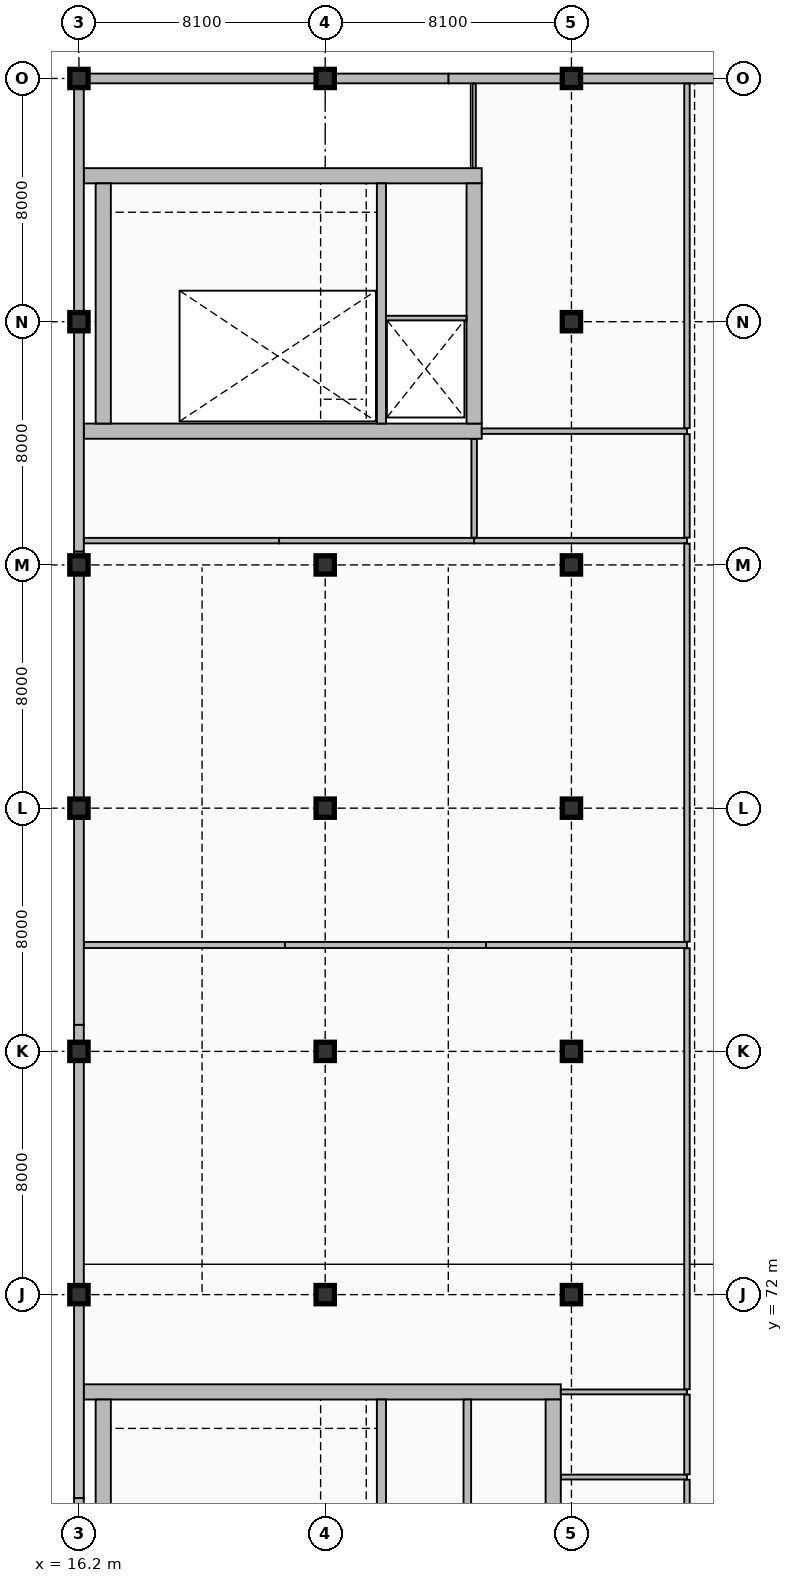
"""IFC4 building model, lengths in metres.
Left out: names, types, materials, properties, quantities, classifications, styles, units other than length and angle.
Written with IfcOpenShell. Run it as: python <this file> out.ifc"""

import sys

from ifc_helpers import new_model, si_unit, direction, frame, frame_2d, origin, origin_2d, place, context, subcontext, project, spatial, rectangle, extrude, element, fill, save


model = new_model("IFC4")
c1 = context("Model", 3, precision=1e-05, world=origin(), true_north=direction((0.0, 1.0)))
c2 = subcontext(c1, "Body", "Model", "MODEL_VIEW")
j1 = project(units=[si_unit("LENGTHUNIT", "METRE"), si_unit("PLANEANGLEUNIT", "RADIAN")], contexts=[c1])
p1 = place(None, origin())
s1 = spatial("IfcSite", under=j1, at=p1, CompositionType="ELEMENT")
p2 = place(p1, origin())
s2 = spatial("IfcBuilding", under=s1, at=p2, CompositionType="ELEMENT")
p3 = place(p2, frame((0.0, 0.0, 14.7)))
s3 = spatial("IfcBuildingStorey", under=s2, at=p3, CompositionType="ELEMENT", Elevation=14.7)
p4 = place(p3, frame((16.36, 68.8, 0.0), z_axis=(0.0, 0.0, 1.0), x_axis=(1.0, 0.0, 0.0)))
e1 = element("IfcWall", 1, at=p4, inside=s3, PredefinedType="SHEAR", context=c2, shape_type="SweptSolid", body=[
    extrude(rectangle(XDim=15.69, YDim=0.5, at=frame_2d((7.845, 0.0))), origin(), (0.0, 0.0, 1.0), 5.1),
])
for number, where, z_axis, x_axis in (
    (2, (17.0, 60.65, 0.0), (0.0, 0.0, 1.0), (0.0, 1.0, 0.0)),
    (3, (31.8, 60.65, 0.0), (0.0, 0.0, 1.0), (0.0, 1.0, 0.0)),
):
    element("IfcWall", number, at=place(p3, frame(where, z_axis=z_axis, x_axis=x_axis)), inside=s3, PredefinedType="SHEAR", context=c2, shape_type="SweptSolid", body=[
        extrude(rectangle(XDim=7.9, YDim=0.5, at=frame_2d((3.95, 0.0))), origin(), (0.0, 0.0, 1.0), 5.1),
    ])
p5 = place(p3, frame((26.15, 60.65, 0.0), z_axis=(0.0, 0.0, 1.0), x_axis=(0.0, 1.0, 0.0)))
e4 = element("IfcWall", 4, at=p5, inside=s3, PredefinedType="SHEAR", context=c2, shape_type="SweptSolid", body=[
    extrude(rectangle(XDim=7.9, YDim=0.3, at=frame_2d((3.95, 0.0))), origin(), (0.0, 0.0, 1.0), 5.1),
])
p6 = place(p3, frame((28.975, 60.65, 0.0), z_axis=(0.0, 0.0, 1.0), x_axis=(0.0, 1.0, 0.0)))
e5 = element("IfcWall", 5, at=p6, inside=s3, PredefinedType="SHEAR", context=c2, shape_type="SweptSolid", body=[
    extrude(rectangle(XDim=7.9, YDim=0.25, at=frame_2d((3.95, 0.0))), origin(), (0.0, 0.0, 1.0), 5.1),
])
p7 = place(p3, frame((16.36, 100.4, 0.0), z_axis=(0.0, 0.0, 1.0), x_axis=(1.0, 0.0, 0.0)))
e6 = element("IfcWall", 6, at=p7, inside=s3, PredefinedType="SHEAR", context=c2, shape_type="SweptSolid", body=[
    extrude(rectangle(XDim=13.09, YDim=0.5, at=frame_2d((6.545, 0.0))), origin(), (0.0, 0.0, 1.0), 5.1),
])
p8 = place(p7, frame((1.39, 0.0, 0.0)))
e7 = element("IfcOpeningElement", 7, at=p8, cuts=e6, PredefinedType="OPENING", context=c2, shape_type="SweptSolid", body=[
    extrude(rectangle(XDim=1.15, YDim=2.25, at=frame_2d((0.575, 1.125))), frame((0.0, 0.26, 0.0), z_axis=(0.0, -1.0, 0.0), x_axis=(1.0, 0.0, 0.0)), (0.0, 0.0, 1.0), 0.52),
])
p9 = place(p7, frame((10.695, 0.0, 0.0)))
e8 = element("IfcOpeningElement", 8, at=p9, cuts=e6, PredefinedType="OPENING", context=c2, shape_type="SweptSolid", body=[
    extrude(rectangle(XDim=1.1, YDim=2.2, at=frame_2d((0.55, 1.1))), frame((0.0, 0.26, 0.0), z_axis=(0.0, -1.0, 0.0), x_axis=(1.0, 0.0, 0.0)), (0.0, 0.0, 1.0), 0.52),
])
p10 = place(p3, frame((16.36, 108.8, 0.0), z_axis=(0.0, 0.0, 1.0), x_axis=(1.0, 0.0, 0.0)))
e9 = element("IfcWall", 9, at=p10, inside=s3, PredefinedType="SHEAR", context=c2, shape_type="SweptSolid", body=[
    extrude(rectangle(XDim=13.09, YDim=0.5, at=frame_2d((6.545, 0.0))), origin(), (0.0, 0.0, 1.0), 5.1),
])
for number, where, z_axis, x_axis in (
    (10, (17.0, 100.65, 0.0), (0.0, 0.0, 1.0), (0.0, 1.0, 0.0)),
    (11, (29.2, 100.65, 0.0), (0.0, 0.0, 1.0), (0.0, 1.0, 0.0)),
):
    element("IfcWall", number, at=place(p3, frame(where, z_axis=z_axis, x_axis=x_axis)), inside=s3, PredefinedType="SHEAR", context=c2, shape_type="SweptSolid", body=[
        extrude(rectangle(XDim=7.9, YDim=0.5, at=frame_2d((3.95, 0.0))), origin(), (0.0, 0.0, 1.0), 5.1),
    ])
p11 = place(p3, frame((26.15, 100.65, 0.0), z_axis=(0.0, 0.0, 1.0), x_axis=(0.0, 1.0, 0.0)))
e12 = element("IfcWall", 12, at=p11, inside=s3, PredefinedType="SHEAR", context=c2, shape_type="SweptSolid", body=[
    extrude(rectangle(XDim=7.9, YDim=0.3, at=frame_2d((3.95, 0.0))), origin(), (0.0, 0.0, 1.0), 5.1),
])
for number, where, z_axis, x_axis in (
    (13, (16.2, 72.0, 0.0), (0.0, 0.0, 1.0), (1.0, 0.0, 0.0)),
    (14, (16.2, 80.0, 0.0), (0.0, 0.0, 1.0), (1.0, 0.0, 0.0)),
    (15, (16.2, 88.0, 0.0), (0.0, 0.0, 1.0), (1.0, 0.0, 0.0)),
    (16, (16.2, 96.0, 0.0), (0.0, 0.0, 1.0), (1.0, 0.0, 0.0)),
    (17, (16.2, 104.0, 0.0), (0.0, 0.0, 1.0), (1.0, 0.0, 0.0)),
    (18, (16.2, 112.0, 0.0), (0.0, 0.0, 1.0), (1.0, 0.0, 0.0)),
    (19, (24.3, 72.0, 0.0), (0.0, 0.0, 1.0), (1.0, 0.0, 0.0)),
    (20, (24.3, 80.0, 0.0), (0.0, 0.0, 1.0), (1.0, 0.0, 0.0)),
    (21, (24.3, 88.0, 0.0), (0.0, 0.0, 1.0), (1.0, 0.0, 0.0)),
    (22, (24.3, 96.0, 0.0), (0.0, 0.0, 1.0), (1.0, 0.0, 0.0)),
    (23, (24.3, 112.0, 0.0), (0.0, 0.0, 1.0), (1.0, 0.0, 0.0)),
    (24, (32.4, 72.0, 0.0), (0.0, 0.0, 1.0), (1.0, 0.0, 0.0)),
    (25, (32.4, 80.0, 0.0), (0.0, 0.0, 1.0), (1.0, 0.0, 0.0)),
    (26, (32.4, 88.0, 0.0), (0.0, 0.0, 1.0), (1.0, 0.0, 0.0)),
    (27, (32.4, 96.0, 0.0), (0.0, 0.0, 1.0), (1.0, 0.0, 0.0)),
    (28, (32.4, 104.0, 0.0), (0.0, 0.0, 1.0), (1.0, 0.0, 0.0)),
    (29, (32.4, 112.0, 0.0), (0.0, 0.0, 1.0), (1.0, 0.0, 0.0)),
):
    element("IfcColumn", number, at=place(p3, frame(where, z_axis=z_axis, x_axis=x_axis)), inside=s3, PredefinedType="COLUMN", context=c2, shape_type="SweptSolid", body=[
        extrude(rectangle(XDim=0.6, YDim=0.6, at=origin_2d()), origin(), (0.0, 0.0, 1.0), 5.1),
    ])
p12 = place(p3, frame((40.5, 112.0, 0.0), z_axis=(0.0, 0.0, 1.0), x_axis=(-1.0, 0.0, 0.0)))
e30 = element("IfcWall", 30, at=p12, inside=s3, PredefinedType="SOLIDWALL", context=c2, shape_type="SweptSolid", body=[
    extrude(rectangle(XDim=12.15, YDim=0.32, at=frame_2d((6.075, 0.0))), origin(), (0.0, 0.0, 1.0), 4.232),
])
p13 = place(p3, frame((28.35, 112.0, 0.0), z_axis=(0.0, 0.0, 1.0), x_axis=(-1.0, 0.0, 0.0)))
e31 = element("IfcWall", 31, at=p13, inside=s3, PredefinedType="SOLIDWALL", context=c2, shape_type="SweptSolid", body=[
    extrude(rectangle(XDim=12.15, YDim=0.32, at=frame_2d((6.075, 0.0))), origin(), (0.0, 0.0, 1.0), 4.232),
])
p14 = place(p13, frame((6.3, 0.0, 0.95)))
e32 = element("IfcOpeningElement", 32, at=p14, cuts=e31, PredefinedType="OPENING", context=c2, shape_type="SweptSolid", body=[
    extrude(rectangle(XDim=3.0, YDim=1.8, at=frame_2d((1.5, 0.9))), frame((0.0, 0.17, 0.0), z_axis=(0.0, -1.0, 0.0), x_axis=(1.0, 0.0, 0.0)), (0.0, 0.0, 1.0), 0.34),
])
p15 = place(p3, frame((16.2, 112.0, 0.0), z_axis=(0.0, 0.0, 1.0), x_axis=(0.0, -1.0, 0.0)))
e33 = element("IfcWall", 33, at=p15, inside=s3, PredefinedType="SOLIDWALL", context=c2, shape_type="SweptSolid", body=[
    extrude(rectangle(XDim=15.564, YDim=0.32, at=frame_2d((7.782, 0.0))), origin(), (0.0, 0.0, 1.0), 4.369),
])
p16 = place(p3, frame((16.2, 96.436, 0.0), z_axis=(0.0, 0.0, 1.0), x_axis=(0.0, -1.0, 0.0)))
e34 = element("IfcWall", 34, at=p16, inside=s3, PredefinedType="SOLIDWALL", context=c2, shape_type="SweptSolid", body=[
    extrude(rectangle(XDim=15.564, YDim=0.32, at=frame_2d((7.782, 0.0))), origin(), (0.0, 0.0, 1.0), 4.332),
])
p17 = place(p16, frame((3.6, 0.0, 0.95)))
e35 = element("IfcOpeningElement", 35, at=p17, cuts=e34, PredefinedType="OPENING", context=c2, shape_type="SweptSolid", body=[
    extrude(rectangle(XDim=3.15, YDim=1.6, at=frame_2d((1.575, 0.8))), frame((0.0, 0.17, 0.0), z_axis=(0.0, -1.0, 0.0), x_axis=(1.0, 0.0, 0.0)), (0.0, 0.0, 1.0), 0.34),
])
p18 = place(p3, frame((16.2, 80.872, 0.0), z_axis=(0.0, 0.0, 1.0), x_axis=(0.0, -1.0, 0.0)))
e36 = element("IfcWall", 36, at=p18, inside=s3, PredefinedType="SOLIDWALL", context=c2, shape_type="SweptSolid", body=[
    extrude(rectangle(XDim=15.564, YDim=0.32, at=frame_2d((7.782, 0.0))), origin(), (0.0, 0.0, 1.0), 4.332),
])
p19 = place(p18, frame((3.6, 0.0, 0.95)))
e37 = element("IfcOpeningElement", 37, at=p19, cuts=e36, PredefinedType="OPENING", context=c2, shape_type="SweptSolid", body=[
    extrude(rectangle(XDim=3.6, YDim=1.8, at=frame_2d((1.8, 0.9))), frame((0.0, 0.17, 0.0), z_axis=(0.0, -1.0, 0.0), x_axis=(1.0, 0.0, 0.0)), (0.0, 0.0, 1.0), 0.34),
])
p20 = place(p3, frame((16.2, 65.308, 0.0), z_axis=(0.0, 0.0, 1.0), x_axis=(0.0, -1.0, 0.0)))
e38 = element("IfcWall", 38, at=p20, inside=s3, PredefinedType="SOLIDWALL", context=c2, shape_type="SweptSolid", body=[
    extrude(rectangle(XDim=15.564, YDim=0.32, at=frame_2d((7.782, 0.0))), origin(), (0.0, 0.0, 1.0), 4.332),
])
p21 = place(p3, frame((26.3, 104.12, 0.0), z_axis=(0.0, 0.0, 1.0), x_axis=(1.0, 0.0, 0.0)))
e39 = element("IfcWall", 39, at=p21, inside=s3, PredefinedType="PARTITIONING", context=c2, shape_type="SweptSolid", body=[
    extrude(rectangle(XDim=2.65, YDim=0.15, at=frame_2d((1.325, 0.0))), origin(), (0.0, 0.0, 1.0), 4.84),
])
p22 = place(p3, frame((16.368, 83.5, 0.0), z_axis=(0.0, 0.0, 1.0), x_axis=(1.0, 0.0, 0.0)))
e40 = element("IfcWall", 40, at=p22, inside=s3, PredefinedType="PARTITIONING", context=c2, shape_type="SweptSolid", body=[
    extrude(rectangle(XDim=6.611, YDim=0.2, at=frame_2d((3.305, 0.0))), origin(), (0.0, 0.0, 1.0), 4.84),
])
for number, where, z_axis, x_axis in (
    (41, (22.979, 83.5, 0.0), (0.0, 0.0, 1.0), (1.0, 0.0, 0.0)),
    (42, (29.589, 83.5, 0.0), (0.0, 0.0, 1.0), (1.0, 0.0, 0.0)),
):
    element("IfcWall", number, at=place(p3, frame(where, z_axis=z_axis, x_axis=x_axis)), inside=s3, PredefinedType="PARTITIONING", context=c2, shape_type="SweptSolid", body=[
        extrude(rectangle(XDim=6.611, YDim=0.2, at=frame_2d((3.305, 0.0))), origin(), (0.0, 0.0, 1.0), 4.84),
    ])
for number, where, z_axis, x_axis in (
    (43, (16.368, 96.8, 0.0), (0.0, 0.0, 1.0), (1.0, 0.0, 0.0)),
    (44, (22.784, 96.8, 0.0), (0.0, 0.0, 1.0), (1.0, 0.0, 0.0)),
):
    element("IfcWall", number, at=place(p3, frame(where, z_axis=z_axis, x_axis=x_axis)), inside=s3, PredefinedType="PARTITIONING", context=c2, shape_type="SweptSolid", body=[
        extrude(rectangle(XDim=6.416, YDim=0.18, at=frame_2d((3.208, 0.0))), origin(), (0.0, 0.0, 1.0), 4.84),
    ])
p23 = place(p3, frame((29.2, 96.8, 0.0), z_axis=(0.0, 0.0, 1.0), x_axis=(1.0, 0.0, 0.0)))
e45 = element("IfcWall", 45, at=p23, inside=s3, PredefinedType="PARTITIONING", context=c2, shape_type="SweptSolid", body=[
    extrude(rectangle(XDim=7.0, YDim=0.18, at=frame_2d((3.5, 0.0))), origin(), (0.0, 0.0, 1.0), 4.84),
])
p24 = place(p3, frame((29.45, 100.4, 0.0), z_axis=(0.0, 0.0, 1.0), x_axis=(1.0, 0.0, 0.0)))
e46 = element("IfcWall", 46, at=p24, inside=s3, PredefinedType="PARTITIONING", context=c2, shape_type="SweptSolid", body=[
    extrude(rectangle(XDim=6.75, YDim=0.18, at=frame_2d((3.375, 0.0))), origin(), (0.0, 0.0, 1.0), 4.84),
])
p25 = place(p3, frame((32.058, 66.0, 0.0), z_axis=(0.0, 0.0, 1.0), x_axis=(1.0, 0.0, 0.0)))
e47 = element("IfcWall", 47, at=p25, inside=s3, PredefinedType="PARTITIONING", context=c2, shape_type="SweptSolid", body=[
    extrude(rectangle(XDim=4.142, YDim=0.16, at=frame_2d((2.071, 0.0))), origin(), (0.0, 0.0, 1.0), 4.84),
])
p26 = place(p3, frame((32.05, 68.8, 0.0), z_axis=(0.0, 0.0, 1.0), x_axis=(1.0, 0.0, 0.0)))
e48 = element("IfcWall", 48, at=p26, inside=s3, PredefinedType="PARTITIONING", context=c2, shape_type="SweptSolid", body=[
    extrude(rectangle(XDim=4.15, YDim=0.16, at=frame_2d((2.075, 0.0))), origin(), (0.0, 0.0, 1.0), 4.84),
])
p27 = place(p3, frame((29.2, 96.898, 0.0), z_axis=(0.0, 0.0, 1.0), x_axis=(0.0, 1.0, 0.0)))
e49 = element("IfcWall", 49, at=p27, inside=s3, PredefinedType="PARTITIONING", context=c2, shape_type="SweptSolid", body=[
    extrude(rectangle(XDim=3.244, YDim=0.18, at=frame_2d((1.622, 0.0))), origin(), (0.0, 0.0, 1.0), 4.84),
])
p28 = place(p27, frame((1.022, 0.0, 0.0)))
e50 = element("IfcOpeningElement", 50, at=p28, cuts=e49, PredefinedType="OPENING", context=c2, shape_type="SweptSolid", body=[
    extrude(rectangle(XDim=1.2, YDim=2.2, at=frame_2d((0.6, 1.1))), frame((0.0, 0.1, 0.0), z_axis=(0.0, -1.0, 0.0), x_axis=(1.0, 0.0, 0.0)), (0.0, 0.0, 1.0), 0.2),
])
p29 = place(p3, frame((29.2, 109.058, 0.0), z_axis=(0.0, 0.0, 1.0), x_axis=(0.0, 1.0, 0.0)))
e51 = element("IfcWall", 51, at=p29, inside=s3, PredefinedType="PARTITIONING", context=c2, shape_type="SweptSolid", body=[
    extrude(rectangle(XDim=2.774, YDim=0.11, at=frame_2d((1.387, 0.0))), origin(), (0.0, 0.0, 1.0), 4.84),
])
p30 = place(p3, frame((36.2, 63.288, 0.0), z_axis=(0.0, 0.0, 1.0), x_axis=(0.0, 1.0, 0.0)))
e52 = element("IfcWall", 52, at=p30, inside=s3, PredefinedType="PARTITIONING", context=c2, shape_type="SweptSolid", body=[
    extrude(rectangle(XDim=2.624, YDim=0.18, at=frame_2d((1.312, 0.0))), origin(), (0.0, 0.0, 1.0), 4.84),
])
p31 = place(p30, frame((0.837, 0.0, 0.0)))
e53 = element("IfcOpeningElement", 53, at=p31, cuts=e52, PredefinedType="OPENING", context=c2, shape_type="SweptSolid", body=[
    extrude(rectangle(XDim=0.95, YDim=2.1, at=frame_2d((0.475, 1.05))), frame((0.0, 0.1, 0.0), z_axis=(0.0, -1.0, 0.0), x_axis=(1.0, 0.0, 0.0)), (0.0, 0.0, 1.0), 0.2),
])
p32 = place(p3, frame((36.2, 66.088, 0.0), z_axis=(0.0, 0.0, 1.0), x_axis=(0.0, 1.0, 0.0)))
e54 = element("IfcWall", 54, at=p32, inside=s3, PredefinedType="PARTITIONING", context=c2, shape_type="SweptSolid", body=[
    extrude(rectangle(XDim=2.624, YDim=0.18, at=frame_2d((1.312, 0.0))), origin(), (0.0, 0.0, 1.0), 4.84),
])
p33 = place(p32, frame((0.812, 0.0, 0.0)))
e55 = element("IfcOpeningElement", 55, at=p33, cuts=e54, PredefinedType="OPENING", context=c2, shape_type="SweptSolid", body=[
    extrude(rectangle(XDim=1.0, YDim=2.15, at=frame_2d((0.5, 1.075))), frame((0.0, 0.1, 0.0), z_axis=(0.0, -1.0, 0.0), x_axis=(1.0, 0.0, 0.0)), (0.0, 0.0, 1.0), 0.2),
])
p34 = place(p3, frame((36.2, 68.888, 0.0), z_axis=(0.0, 0.0, 1.0), x_axis=(0.0, 1.0, 0.0)))
e56 = element("IfcWall", 56, at=p34, inside=s3, PredefinedType="PARTITIONING", context=c2, shape_type="SweptSolid", body=[
    extrude(rectangle(XDim=14.504, YDim=0.18, at=frame_2d((7.252, 0.0))), origin(), (0.0, 0.0, 1.0), 4.529),
])
p35 = place(p34, frame((6.702, 0.0, 0.0)))
e57 = element("IfcOpeningElement", 57, at=p35, cuts=e56, PredefinedType="OPENING", context=c2, shape_type="SweptSolid", body=[
    extrude(rectangle(XDim=1.1, YDim=2.2, at=frame_2d((0.55, 1.1))), frame((0.0, 0.1, 0.0), z_axis=(0.0, -1.0, 0.0), x_axis=(1.0, 0.0, 0.0)), (0.0, 0.0, 1.0), 0.2),
])
p36 = place(p3, frame((36.2, 83.608, 0.0), z_axis=(0.0, 0.0, 1.0), x_axis=(0.0, 1.0, 0.0)))
e58 = element("IfcWall", 58, at=p36, inside=s3, PredefinedType="PARTITIONING", context=c2, shape_type="SweptSolid", body=[
    extrude(rectangle(XDim=13.094, YDim=0.18, at=frame_2d((6.547, 0.0))), origin(), (0.0, 0.0, 1.0), 4.478),
])
p37 = place(p36, frame((5.997, 0.0, 0.0)))
e59 = element("IfcOpeningElement", 59, at=p37, cuts=e58, PredefinedType="OPENING", context=c2, shape_type="SweptSolid", body=[
    extrude(rectangle(XDim=1.1, YDim=2.2, at=frame_2d((0.55, 1.1))), frame((0.0, 0.1, 0.0), z_axis=(0.0, -1.0, 0.0), x_axis=(1.0, 0.0, 0.0)), (0.0, 0.0, 1.0), 0.2),
])
p38 = place(p3, frame((36.2, 96.898, 0.0), z_axis=(0.0, 0.0, 1.0), x_axis=(0.0, 1.0, 0.0)))
e60 = element("IfcWall", 60, at=p38, inside=s3, PredefinedType="PARTITIONING", context=c2, shape_type="SweptSolid", body=[
    extrude(rectangle(XDim=3.404, YDim=0.18, at=frame_2d((1.702, 0.0))), origin(), (0.0, 0.0, 1.0), 4.478),
])
p39 = place(p38, frame((1.152, 0.0, 0.0)))
e61 = element("IfcOpeningElement", 61, at=p39, cuts=e60, PredefinedType="OPENING", context=c2, shape_type="SweptSolid", body=[
    extrude(rectangle(XDim=1.1, YDim=2.2, at=frame_2d((0.55, 1.1))), frame((0.0, 0.1, 0.0), z_axis=(0.0, -1.0, 0.0), x_axis=(1.0, 0.0, 0.0)), (0.0, 0.0, 1.0), 0.2),
])
p40 = place(p3, frame((36.2, 100.498, 0.0), z_axis=(0.0, 0.0, 1.0), x_axis=(0.0, 1.0, 0.0)))
e62 = element("IfcWall", 62, at=p40, inside=s3, PredefinedType="PARTITIONING", context=c2, shape_type="SweptSolid", body=[
    extrude(rectangle(XDim=11.334, YDim=0.18, at=frame_2d((5.667, 0.0))), origin(), (0.0, 0.0, 1.0), 4.478),
])
p41 = place(p40, frame((5.167, 0.0, 0.0)))
e63 = element("IfcOpeningElement", 63, at=p41, cuts=e62, PredefinedType="OPENING", context=c2, shape_type="SweptSolid", body=[
    extrude(rectangle(XDim=1.0, YDim=2.2, at=frame_2d((0.5, 1.1))), frame((0.0, 0.1, 0.0), z_axis=(0.0, -1.0, 0.0), x_axis=(1.0, 0.0, 0.0)), (0.0, 0.0, 1.0), 0.2),
])
p42 = place(p14, origin())
e64 = element("IfcWindow", 64, at=p42, inside=s3, PartitioningType="TRIPLE_PANEL_VERTICAL", PredefinedType="WINDOW", context=c2, shape_type="SweptSolid", body=[
    extrude(rectangle(XDim=3.0, YDim=1.8, at=frame_2d((1.5, 0.9))), frame((0.0, 0.03, 0.0), z_axis=(0.0, -1.0, 0.0), x_axis=(1.0, 0.0, 0.0)), (0.0, 0.0, 1.0), 0.06),
])
fill(e32, e64)
p43 = place(p17, origin())
e65 = element("IfcWindow", 65, at=p43, inside=s3, PartitioningType="TRIPLE_PANEL_VERTICAL", PredefinedType="WINDOW", context=c2, shape_type="SweptSolid", body=[
    extrude(rectangle(XDim=3.15, YDim=1.6, at=frame_2d((1.575, 0.8))), frame((0.0, 0.03, 0.0), z_axis=(0.0, -1.0, 0.0), x_axis=(1.0, 0.0, 0.0)), (0.0, 0.0, 1.0), 0.06),
])
fill(e35, e65)
p44 = place(p19, origin())
e66 = element("IfcWindow", 66, at=p44, inside=s3, PartitioningType="TRIPLE_PANEL_VERTICAL", PredefinedType="WINDOW", context=c2, shape_type="SweptSolid", body=[
    extrude(rectangle(XDim=3.6, YDim=1.8, at=frame_2d((1.8, 0.9))), frame((0.0, 0.03, 0.0), z_axis=(0.0, -1.0, 0.0), x_axis=(1.0, 0.0, 0.0)), (0.0, 0.0, 1.0), 0.06),
])
fill(e37, e66)
p45 = place(p8, origin())
e67 = element("IfcDoor", 67, at=p45, inside=s3, OperationType="SINGLE_SWING_LEFT", PredefinedType="DOOR", context=c2, shape_type="SweptSolid", body=[
    extrude(rectangle(XDim=1.15, YDim=2.25, at=frame_2d((0.575, 1.125))), frame((0.0, 0.025, 0.0), z_axis=(0.0, -1.0, 0.0), x_axis=(1.0, 0.0, 0.0)), (0.0, 0.0, 1.0), 0.05),
])
fill(e7, e67)
p46 = place(p9, frame((1.1, 0.0, 0.0), z_axis=(0.0, 0.0, 1.0), x_axis=(-1.0, 0.0, 0.0)))
e68 = element("IfcDoor", 68, at=p46, inside=s3, OperationType="DOUBLE_DOOR_SLIDING", PredefinedType="DOOR", context=c2, shape_type="SweptSolid", body=[
    extrude(rectangle(XDim=1.1, YDim=2.2, at=frame_2d((0.55, 1.1))), frame((0.0, 0.025, 0.0), z_axis=(0.0, -1.0, 0.0), x_axis=(1.0, 0.0, 0.0)), (0.0, 0.0, 1.0), 0.05),
])
fill(e8, e68)
p47 = place(p28, frame((1.2, 0.0, 0.0), z_axis=(0.0, 0.0, 1.0), x_axis=(-1.0, 0.0, 0.0)))
e69 = element("IfcDoor", 69, at=p47, inside=s3, OperationType="SINGLE_SWING_RIGHT", PredefinedType="DOOR", context=c2, shape_type="SweptSolid", body=[
    extrude(rectangle(XDim=1.2, YDim=2.2, at=frame_2d((0.6, 1.1))), frame((0.0, 0.025, 0.0), z_axis=(0.0, -1.0, 0.0), x_axis=(1.0, 0.0, 0.0)), (0.0, 0.0, 1.0), 0.05),
])
fill(e50, e69)
p48 = place(p33, origin())
e70 = element("IfcDoor", 70, at=p48, inside=s3, OperationType="SINGLE_SWING_LEFT", PredefinedType="DOOR", context=c2, shape_type="SweptSolid", body=[
    extrude(rectangle(XDim=1.0, YDim=2.15, at=frame_2d((0.5, 1.075))), frame((0.0, 0.025, 0.0), z_axis=(0.0, -1.0, 0.0), x_axis=(1.0, 0.0, 0.0)), (0.0, 0.0, 1.0), 0.05),
])
fill(e55, e70)
p49 = place(p35, origin())
e71 = element("IfcDoor", 71, at=p49, inside=s3, OperationType="SINGLE_SWING_RIGHT", PredefinedType="DOOR", context=c2, shape_type="SweptSolid", body=[
    extrude(rectangle(XDim=1.1, YDim=2.2, at=frame_2d((0.55, 1.1))), frame((0.0, 0.025, 0.0), z_axis=(0.0, -1.0, 0.0), x_axis=(1.0, 0.0, 0.0)), (0.0, 0.0, 1.0), 0.05),
])
fill(e57, e71)
p50 = place(p37, origin())
e72 = element("IfcDoor", 72, at=p50, inside=s3, OperationType="SINGLE_SWING_LEFT", PredefinedType="DOOR", context=c2, shape_type="SweptSolid", body=[
    extrude(rectangle(XDim=1.1, YDim=2.2, at=frame_2d((0.55, 1.1))), frame((0.0, 0.025, 0.0), z_axis=(0.0, -1.0, 0.0), x_axis=(1.0, 0.0, 0.0)), (0.0, 0.0, 1.0), 0.05),
])
fill(e59, e72)
p51 = place(p39, origin())
e73 = element("IfcDoor", 73, at=p51, inside=s3, OperationType="SINGLE_SWING_RIGHT", PredefinedType="DOOR", context=c2, shape_type="SweptSolid", body=[
    extrude(rectangle(XDim=1.1, YDim=2.2, at=frame_2d((0.55, 1.1))), frame((0.0, 0.025, 0.0), z_axis=(0.0, -1.0, 0.0), x_axis=(1.0, 0.0, 0.0)), (0.0, 0.0, 1.0), 0.05),
])
fill(e61, e73)
p52 = place(p41, origin())
e74 = element("IfcDoor", 74, at=p52, inside=s3, OperationType="SINGLE_SWING_LEFT", PredefinedType="DOOR", context=c2, shape_type="SweptSolid", body=[
    extrude(rectangle(XDim=1.0, YDim=2.2, at=frame_2d((0.5, 1.1))), frame((0.0, 0.025, 0.0), z_axis=(0.0, -1.0, 0.0), x_axis=(1.0, 0.0, 0.0)), (0.0, 0.0, 1.0), 0.05),
])
fill(e63, e74)
save(model, sys.argv[1])
